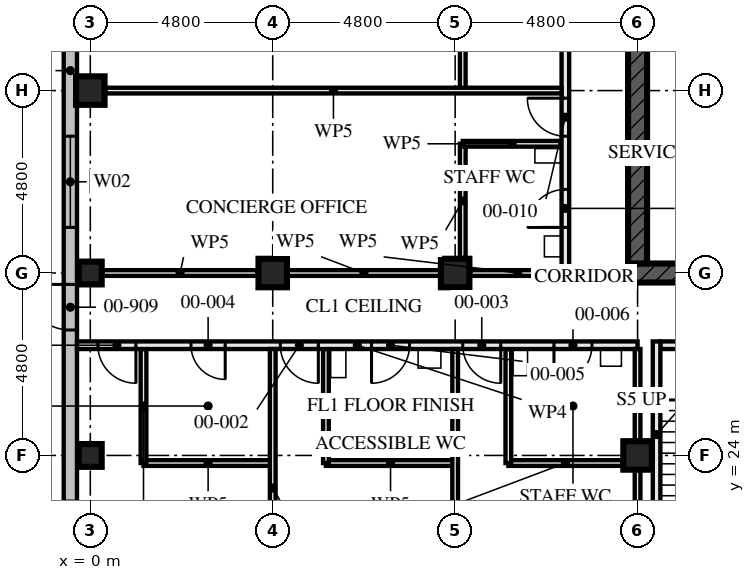
"""IFC4 building model, lengths in metres.
Left out: names, types, materials, properties, quantities, classifications, styles, units other than length and angle.
Written with IfcOpenShell. Run it as: python <this file> out.ifc"""

import sys

from ifc_helpers import new_model, si_unit, direction, frame, frame_2d, origin, origin_2d, place, context, subcontext, project, spatial, rectangle, hollow_rectangle, extrude, element, fill, save


model = new_model("IFC4")
c1 = context("Model", 3, precision=1e-05, world=origin(), true_north=direction((0.0, 1.0)))
c2 = subcontext(c1, "Body", "Model", "MODEL_VIEW")
j1 = project(units=[si_unit("LENGTHUNIT", "METRE"), si_unit("PLANEANGLEUNIT", "RADIAN")], contexts=[c1])
p1 = place(None, origin())
s1 = spatial("IfcSite", under=j1, at=p1, CompositionType="ELEMENT")
p2 = place(p1, origin())
s2 = spatial("IfcBuilding", under=s1, at=p2, CompositionType="ELEMENT")
p3 = place(p2, origin())
s3 = spatial("IfcBuildingStorey", under=s2, at=p3, CompositionType="ELEMENT", Elevation=0.0)
for number, where, z_axis, x_axis in (
    (1, (0.0, 24.0, 0.0), (0.0, 0.0, 1.0), (1.0, 0.0, 0.0)),
    (2, (0.0, 28.8, 0.0), (0.0, 0.0, 1.0), (0.0, 1.0, 0.0)),
):
    element("IfcColumn", number, at=place(p3, frame(where, z_axis=z_axis, x_axis=x_axis)), inside=s3, PredefinedType="COLUMN", context=c2, shape_type="SweptSolid", body=[
        extrude(hollow_rectangle(XDim=0.6, YDim=0.6, WallThickness=0.08, at=origin_2d()), origin(), (0.0, 0.0, 1.0), 4.5),
    ])
for number, where, z_axis, x_axis in (
    (3, (0.0, 33.6, 0.0), (0.0, 0.0, 1.0), (1.0, 0.0, 0.0)),
    (4, (4.8, 28.8, 0.0), (0.0, 0.0, 1.0), (0.0, 1.0, 0.0)),
    (5, (9.6, 28.8, 0.0), (0.0, 0.0, 1.0), (0.0, 1.0, 0.0)),
    (6, (14.4, 24.0, 0.0), (0.0, 0.0, 1.0), (1.0, 0.0, 0.0)),
):
    element("IfcColumn", number, at=place(p3, frame(where, z_axis=z_axis, x_axis=x_axis)), inside=s3, PredefinedType="COLUMN", context=c2, shape_type="SweptSolid", body=[
        extrude(hollow_rectangle(XDim=0.75, YDim=0.75, WallThickness=0.08, at=origin_2d()), origin(), (0.0, 0.0, 1.0), 4.5),
    ])
p4 = place(p3, frame((14.15, 28.8, -1.8), z_axis=(0.0, 0.0, 1.0), x_axis=(1.0, 0.0, 0.0)))
e7 = element("IfcWall", 7, at=p4, inside=s3, PredefinedType="SHEAR", context=c2, shape_type="SweptSolid", body=[
    extrude(rectangle(XDim=14.9, YDim=0.5, at=frame_2d((7.45, 0.0))), origin(), (0.0, 0.0, 1.0), 6.13),
])
p5 = place(p4, frame((6.85, 0.0, 1.8)))
e8 = element("IfcOpeningElement", 8, at=p5, cuts=e7, PredefinedType="OPENING", context=c2, shape_type="SweptSolid", body=[
    extrude(rectangle(XDim=1.2, YDim=2.1, at=frame_2d((0.6, 1.05))), frame((0.0, 0.26, 0.0), z_axis=(0.0, -1.0, 0.0), x_axis=(1.0, 0.0, 0.0)), (0.0, 0.0, 1.0), 0.521),
])
p6 = place(p3, frame((14.4, 42.95, -1.8), z_axis=(0.0, 0.0, 1.0), x_axis=(0.0, -1.0, 0.0)))
e9 = element("IfcWall", 9, at=p6, inside=s3, PredefinedType="SHEAR", context=c2, shape_type="SweptSolid", body=[
    extrude(rectangle(XDim=13.9, YDim=0.5, at=frame_2d((6.95, 0.0))), origin(), (0.0, 0.0, 1.0), 6.13),
])
p7 = place(p6, frame((6.35, 0.0, 1.8)))
e10 = element("IfcOpeningElement", 10, at=p7, cuts=e9, PredefinedType="OPENING", context=c2, shape_type="SweptSolid", body=[
    extrude(rectangle(XDim=1.2, YDim=2.1, at=frame_2d((0.6, 1.05))), frame((0.0, 0.26, 0.0), z_axis=(0.0, -1.0, 0.0), x_axis=(1.0, 0.0, 0.0)), (0.0, 0.0, 1.0), 0.521),
])
p8 = place(p3, frame((-0.525, 53.325, 0.0), z_axis=(0.0, 0.0, 1.0), x_axis=(0.0, -1.0, 0.0)))
e11 = element("IfcWall", 11, at=p8, inside=s3, PredefinedType="SOLIDWALL", context=c2, shape_type="SweptSolid", body=[
    extrude(rectangle(XDim=38.4, YDim=0.35, at=frame_2d((19.2, 0.0))), origin(), (0.0, 0.0, 1.0), 4.5),
])
p9 = place(p8, frame((11.925, 0.0, 0.0)))
e12 = element("IfcOpeningElement", 12, at=p9, cuts=e11, PredefinedType="OPENING", context=c2, shape_type="SweptSolid", body=[
    extrude(rectangle(XDim=1.2, YDim=2.4, at=frame_2d((0.6, 1.2))), frame((0.0, 0.186, 0.0), z_axis=(0.0, -1.0, 0.0), x_axis=(1.0, 0.0, 0.0)), (0.0, 0.0, 1.0), 0.371),
])
p10 = place(p8, frame((24.825, 0.0, 0.0)))
e13 = element("IfcOpeningElement", 13, at=p10, cuts=e11, PredefinedType="OPENING", context=c2, shape_type="SweptSolid", body=[
    extrude(rectangle(XDim=1.2, YDim=2.4, at=frame_2d((0.6, 1.2))), frame((0.0, 0.186, 0.0), z_axis=(0.0, -1.0, 0.0), x_axis=(1.0, 0.0, 0.0)), (0.0, 0.0, 1.0), 0.371),
])
p11 = place(p8, frame((35.325, 0.0, 0.9)))
e14 = element("IfcOpeningElement", 14, at=p11, cuts=e11, PredefinedType="OPENING", context=c2, shape_type="SweptSolid", body=[
    extrude(rectangle(XDim=2.4, YDim=2.4, at=frame_2d((1.2, 1.2))), frame((0.0, 0.186, 0.0), z_axis=(0.0, -1.0, 0.0), x_axis=(1.0, 0.0, 0.0)), (0.0, 0.0, 1.0), 0.371),
])
p12 = place(p8, frame((30.525, 0.0, 0.9)))
e15 = element("IfcOpeningElement", 15, at=p12, cuts=e11, PredefinedType="OPENING", context=c2, shape_type="SweptSolid", body=[
    extrude(rectangle(XDim=2.4, YDim=2.4, at=frame_2d((1.2, 1.2))), frame((0.0, 0.186, 0.0), z_axis=(0.0, -1.0, 0.0), x_axis=(1.0, 0.0, 0.0)), (0.0, 0.0, 1.0), 0.371),
])
p13 = place(p8, frame((20.925, 0.0, 0.9)))
e16 = element("IfcOpeningElement", 16, at=p13, cuts=e11, PredefinedType="OPENING", context=c2, shape_type="SweptSolid", body=[
    extrude(rectangle(XDim=2.4, YDim=2.4, at=frame_2d((1.2, 1.2))), frame((0.0, 0.186, 0.0), z_axis=(0.0, -1.0, 0.0), x_axis=(1.0, 0.0, 0.0)), (0.0, 0.0, 1.0), 0.371),
])
p14 = place(p8, frame((16.125, 0.0, 0.9)))
e17 = element("IfcOpeningElement", 17, at=p14, cuts=e11, PredefinedType="OPENING", context=c2, shape_type="SweptSolid", body=[
    extrude(rectangle(XDim=2.4, YDim=2.4, at=frame_2d((1.2, 1.2))), frame((0.0, 0.186, 0.0), z_axis=(0.0, -1.0, 0.0), x_axis=(1.0, 0.0, 0.0)), (0.0, 0.0, 1.0), 0.371),
])
p15 = place(p8, frame((6.525, 0.0, 0.9)))
e18 = element("IfcOpeningElement", 18, at=p15, cuts=e11, PredefinedType="OPENING", context=c2, shape_type="SweptSolid", body=[
    extrude(rectangle(XDim=2.4, YDim=2.4, at=frame_2d((1.2, 1.2))), frame((0.0, 0.186, 0.0), z_axis=(0.0, -1.0, 0.0), x_axis=(1.0, 0.0, 0.0)), (0.0, 0.0, 1.0), 0.371),
])
p16 = place(p8, frame((1.725, 0.0, 0.9)))
e19 = element("IfcOpeningElement", 19, at=p16, cuts=e11, PredefinedType="OPENING", context=c2, shape_type="SweptSolid", body=[
    extrude(rectangle(XDim=2.4, YDim=2.4, at=frame_2d((1.2, 1.2))), frame((0.0, 0.186, 0.0), z_axis=(0.0, -1.0, 0.0), x_axis=(1.0, 0.0, 0.0)), (0.0, 0.0, 1.0), 0.371),
])
p17 = place(p3, frame((1.4, 23.8, 0.0), z_axis=(0.0, 0.0, 1.0), x_axis=(0.0, 1.0, 0.0)))
e20 = element("IfcWall", 20, at=p17, inside=s3, PredefinedType="PARTITIONING", context=c2, shape_type="SweptSolid", body=[
    extrude(rectangle(XDim=3.0, YDim=0.15, at=frame_2d((1.5, 0.0))), origin(), (0.0, 0.0, 1.0), 3.55),
])
p18 = place(p3, frame((1.4, 23.8, 0.0), z_axis=(0.0, 0.0, 1.0), x_axis=(1.0, 0.0, 0.0)))
e21 = element("IfcWall", 21, at=p18, inside=s3, PredefinedType="PARTITIONING", context=c2, shape_type="SweptSolid", body=[
    extrude(rectangle(XDim=3.4, YDim=0.15, at=frame_2d((1.7, 0.0))), origin(), (0.0, 0.0, 1.0), 4.33),
])
p19 = place(p3, frame((6.2, 23.8, 0.0), z_axis=(0.0, 0.0, 1.0), x_axis=(0.0, 1.0, 0.0)))
e22 = element("IfcWall", 22, at=p19, inside=s3, PredefinedType="PARTITIONING", context=c2, shape_type="SweptSolid", body=[
    extrude(rectangle(XDim=3.0, YDim=0.15, at=frame_2d((1.5, 0.0))), origin(), (0.0, 0.0, 1.0), 3.55),
])
p20 = place(p3, frame((6.2, 23.8, 0.0), z_axis=(0.0, 0.0, 1.0), x_axis=(1.0, 0.0, 0.0)))
e23 = element("IfcWall", 23, at=p20, inside=s3, PredefinedType="PARTITIONING", context=c2, shape_type="SweptSolid", body=[
    extrude(rectangle(XDim=3.4, YDim=0.15, at=frame_2d((1.7, 0.0))), origin(), (0.0, 0.0, 1.0), 4.33),
])
p21 = place(p3, frame((11.0, 23.8, 0.0), z_axis=(0.0, 0.0, 1.0), x_axis=(0.0, 1.0, 0.0)))
e24 = element("IfcWall", 24, at=p21, inside=s3, PredefinedType="PARTITIONING", context=c2, shape_type="SweptSolid", body=[
    extrude(rectangle(XDim=3.0, YDim=0.15, at=frame_2d((1.5, 0.0))), origin(), (0.0, 0.0, 1.0), 3.55),
])
p22 = place(p3, frame((11.0, 23.8, 0.0), z_axis=(0.0, 0.0, 1.0), x_axis=(1.0, 0.0, 0.0)))
e25 = element("IfcWall", 25, at=p22, inside=s3, PredefinedType="PARTITIONING", context=c2, shape_type="SweptSolid", body=[
    extrude(rectangle(XDim=3.005, YDim=0.15, at=frame_2d((1.502, 0.0))), origin(), (0.0, 0.0, 1.0), 4.33),
])
p23 = place(p3, frame((4.8, 19.486, 0.0), z_axis=(0.0, 0.0, 1.0), x_axis=(0.0, 1.0, 0.0)))
e26 = element("IfcWall", 26, at=p23, inside=s3, PredefinedType="PARTITIONING", context=c2, shape_type="SweptSolid", body=[
    extrude(rectangle(XDim=7.314, YDim=0.15, at=frame_2d((3.657, 0.0))), origin(), (0.0, 0.0, 1.0), 3.55),
])
p24 = place(p3, frame((9.6, 14.686, 0.0), z_axis=(0.0, 0.0, 1.0), x_axis=(0.0, 1.0, 0.0)))
e27 = element("IfcWall", 27, at=p24, inside=s3, PredefinedType="PARTITIONING", context=c2, shape_type="SweptSolid", body=[
    extrude(rectangle(XDim=12.115, YDim=0.15, at=frame_2d((6.057, 0.0))), origin(), (0.0, 0.0, 1.0), 3.55),
])
p25 = place(p3, frame((-0.35, 26.9, 0.0), z_axis=(0.0, 0.0, 1.0), x_axis=(1.0, 0.0, 0.0)))
e28 = element("IfcWall", 28, at=p25, inside=s3, PredefinedType="PARTITIONING", context=c2, shape_type="SweptSolid", body=[
    extrude(rectangle(XDim=14.75, YDim=0.2, at=frame_2d((7.375, 0.0))), origin(), (0.0, 0.0, 1.0), 3.32),
])
p26 = place(p25, frame((0.55, 0.0, 0.0)))
e29 = element("IfcOpeningElement", 29, at=p26, cuts=e28, PredefinedType="OPENING", context=c2, shape_type="SweptSolid", body=[
    extrude(rectangle(XDim=1.0, YDim=2.4, at=frame_2d((0.5, 1.2))), frame((0.0, 0.111, 0.0), z_axis=(0.0, -1.0, 0.0), x_axis=(1.0, 0.0, 0.0)), (0.0, 0.0, 1.0), 0.221),
])
p27 = place(p25, frame((5.35, 0.0, 0.0)))
e30 = element("IfcOpeningElement", 30, at=p27, cuts=e28, PredefinedType="OPENING", context=c2, shape_type="SweptSolid", body=[
    extrude(rectangle(XDim=1.0, YDim=2.4, at=frame_2d((0.5, 1.2))), frame((0.0, 0.111, 0.0), z_axis=(0.0, -1.0, 0.0), x_axis=(1.0, 0.0, 0.0)), (0.0, 0.0, 1.0), 0.221),
])
p28 = place(p25, frame((10.15, 0.0, 0.0)))
e31 = element("IfcOpeningElement", 31, at=p28, cuts=e28, PredefinedType="OPENING", context=c2, shape_type="SweptSolid", body=[
    extrude(rectangle(XDim=1.0, YDim=2.4, at=frame_2d((0.5, 1.2))), frame((0.0, 0.111, 0.0), z_axis=(0.0, -1.0, 0.0), x_axis=(1.0, 0.0, 0.0)), (0.0, 0.0, 1.0), 0.221),
])
p29 = place(p25, frame((3.0, 0.0, 0.0)))
e32 = element("IfcOpeningElement", 32, at=p29, cuts=e28, PredefinedType="OPENING", context=c2, shape_type="SweptSolid", body=[
    extrude(rectangle(XDim=0.9, YDim=2.1, at=frame_2d((0.45, 1.05))), frame((0.0, 0.111, 0.0), z_axis=(0.0, -1.0, 0.0), x_axis=(1.0, 0.0, 0.0)), (0.0, 0.0, 1.0), 0.221),
])
p30 = place(p25, frame((7.75, 0.0, 0.0)))
e33 = element("IfcOpeningElement", 33, at=p30, cuts=e28, PredefinedType="OPENING", context=c2, shape_type="SweptSolid", body=[
    extrude(rectangle(XDim=1.0, YDim=2.1, at=frame_2d((0.5, 1.05))), frame((0.0, 0.111, 0.0), z_axis=(0.0, -1.0, 0.0), x_axis=(1.0, 0.0, 0.0)), (0.0, 0.0, 1.0), 0.221),
])
p31 = place(p25, frame((12.55, 0.0, 0.0)))
e34 = element("IfcOpeningElement", 34, at=p31, cuts=e28, PredefinedType="OPENING", context=c2, shape_type="SweptSolid", body=[
    extrude(rectangle(XDim=1.0, YDim=2.1, at=frame_2d((0.5, 1.05))), frame((0.0, 0.111, 0.0), z_axis=(0.0, -1.0, 0.0), x_axis=(1.0, 0.0, 0.0)), (0.0, 0.0, 1.0), 0.221),
])
p32 = place(p3, frame((9.8, 37.0, 0.0), z_axis=(0.0, 0.0, 1.0), x_axis=(0.0, -1.0, 0.0)))
e35 = element("IfcWall", 35, at=p32, inside=s3, PredefinedType="PARTITIONING", context=c2, shape_type="SweptSolid", body=[
    extrude(rectangle(XDim=3.4, YDim=0.15, at=frame_2d((1.7, 0.0))), origin(), (0.0, 0.0, 1.0), 4.33),
])
p33 = place(p3, frame((9.8, 32.2, 0.0), z_axis=(0.0, 0.0, 1.0), x_axis=(1.0, 0.0, 0.0)))
e36 = element("IfcWall", 36, at=p33, inside=s3, PredefinedType="PARTITIONING", context=c2, shape_type="SweptSolid", body=[
    extrude(rectangle(XDim=2.6, YDim=0.15, at=frame_2d((1.3, 0.0))), origin(), (0.0, 0.0, 1.0), 4.33),
])
p34 = place(p3, frame((9.8, 32.2, 0.0), z_axis=(0.0, 0.0, 1.0), x_axis=(0.0, -1.0, 0.0)))
e37 = element("IfcWall", 37, at=p34, inside=s3, PredefinedType="PARTITIONING", context=c2, shape_type="SweptSolid", body=[
    extrude(rectangle(XDim=3.005, YDim=0.15, at=frame_2d((1.502, 0.0))), origin(), (0.0, 0.0, 1.0), 4.33),
])
p35 = place(p3, frame((0.395, 33.6, 0.0), z_axis=(0.0, 0.0, 1.0), x_axis=(1.0, 0.0, 0.0)))
e38 = element("IfcWall", 38, at=p35, inside=s3, PredefinedType="PARTITIONING", context=c2, shape_type="SweptSolid", body=[
    extrude(rectangle(XDim=12.005, YDim=0.15, at=frame_2d((6.002, 0.0))), origin(), (0.0, 0.0, 1.0), 3.55),
])
p36 = place(p3, frame((12.5, 43.2, 0.0), z_axis=(0.0, 0.0, 1.0), x_axis=(0.0, -1.0, 0.0)))
e39 = element("IfcWall", 39, at=p36, inside=s3, PredefinedType="PARTITIONING", context=c2, shape_type="SweptSolid", body=[
    extrude(rectangle(XDim=14.4, YDim=0.2, at=frame_2d((7.2, 0.0))), origin(), (0.0, 0.0, 1.0), 3.55),
])
p37 = place(p36, frame((3.462, 0.0, 0.0)))
e40 = element("IfcOpeningElement", 40, at=p37, cuts=e39, PredefinedType="OPENING", context=c2, shape_type="SweptSolid", body=[
    extrude(rectangle(XDim=1.2, YDim=2.4, at=frame_2d((0.6, 1.2))), frame((0.0, 0.111, 0.0), z_axis=(0.0, -1.0, 0.0), x_axis=(1.0, 0.0, 0.0)), (0.0, 0.0, 1.0), 0.221),
])
p38 = place(p36, frame((5.0, 0.0, 0.0)))
e41 = element("IfcOpeningElement", 41, at=p38, cuts=e39, PredefinedType="OPENING", context=c2, shape_type="SweptSolid", body=[
    extrude(rectangle(XDim=1.0, YDim=2.4, at=frame_2d((0.5, 1.2))), frame((0.0, 0.111, 0.0), z_axis=(0.0, -1.0, 0.0), x_axis=(1.0, 0.0, 0.0)), (0.0, 0.0, 1.0), 0.221),
])
p39 = place(p36, frame((9.8, 0.0, 0.0)))
e42 = element("IfcOpeningElement", 42, at=p39, cuts=e39, PredefinedType="OPENING", context=c2, shape_type="SweptSolid", body=[
    extrude(rectangle(XDim=1.0, YDim=2.4, at=frame_2d((0.5, 1.2))), frame((0.0, 0.111, 0.0), z_axis=(0.0, -1.0, 0.0), x_axis=(1.0, 0.0, 0.0)), (0.0, 0.0, 1.0), 0.221),
])
p40 = place(p36, frame((7.45, 0.0, 0.0)))
e43 = element("IfcOpeningElement", 43, at=p40, cuts=e39, PredefinedType="OPENING", context=c2, shape_type="SweptSolid", body=[
    extrude(rectangle(XDim=0.9, YDim=2.1, at=frame_2d((0.45, 1.05))), frame((0.0, 0.111, 0.0), z_axis=(0.0, -1.0, 0.0), x_axis=(1.0, 0.0, 0.0)), (0.0, 0.0, 1.0), 0.221),
])
p41 = place(p36, frame((12.2, 0.0, 0.0)))
e44 = element("IfcOpeningElement", 44, at=p41, cuts=e39, PredefinedType="OPENING", context=c2, shape_type="SweptSolid", body=[
    extrude(rectangle(XDim=1.0, YDim=2.1, at=frame_2d((0.5, 1.05))), frame((0.0, 0.111, 0.0), z_axis=(0.0, -1.0, 0.0), x_axis=(1.0, 0.0, 0.0)), (0.0, 0.0, 1.0), 0.221),
])
p42 = place(p3, frame((14.9, 22.1, 0.0), z_axis=(0.0, 0.0, 1.0), x_axis=(0.0, 1.0, 0.0)))
e45 = element("IfcWall", 45, at=p42, inside=s3, PredefinedType="SOLIDWALL", context=c2, shape_type="SweptSolid", body=[
    extrude(rectangle(XDim=4.9, YDim=0.2, at=frame_2d((2.45, 0.0))), origin(), (0.0, 0.0, 1.0), 3.99),
])
p43 = place(p3, frame((15.0, 26.9, 0.0), z_axis=(0.0, 0.0, 1.0), x_axis=(1.0, 0.0, 0.0)))
e46 = element("IfcWall", 46, at=p43, inside=s3, PredefinedType="SOLIDWALL", context=c2, shape_type="SweptSolid", body=[
    extrude(rectangle(XDim=2.6, YDim=0.2, at=frame_2d((1.3, 0.0))), origin(), (0.0, 0.0, 1.0), 4.33),
])
p44 = place(p43, frame((0.8, 0.0, 0.0)))
e47 = element("IfcOpeningElement", 47, at=p44, cuts=e46, PredefinedType="OPENING", context=c2, shape_type="SweptSolid", body=[
    extrude(rectangle(XDim=1.0, YDim=2.1, at=frame_2d((0.5, 1.05))), frame((0.0, 0.111, 0.0), z_axis=(0.0, -1.0, 0.0), x_axis=(1.0, 0.0, 0.0)), (0.0, 0.0, 1.0), 0.221),
])
p45 = place(p3, frame((12.5, 28.8, 0.0), z_axis=(0.0, 0.0, 1.0), x_axis=(-1.0, 0.0, 0.0)))
e48 = element("IfcWall", 48, at=p45, inside=s3, PredefinedType="PARTITIONING", context=c2, shape_type="SweptSolid", body=[
    extrude(rectangle(XDim=2.505, YDim=0.15, at=frame_2d((1.252, 0.0))), origin(), (0.0, 0.0, 1.0), 3.32),
])
p46 = place(p3, frame((9.205, 28.8, 0.0), z_axis=(0.0, 0.0, 1.0), x_axis=(-1.0, 0.0, 0.0)))
e49 = element("IfcWall", 49, at=p46, inside=s3, PredefinedType="PARTITIONING", context=c2, shape_type="SweptSolid", body=[
    extrude(rectangle(XDim=4.01, YDim=0.15, at=frame_2d((2.005, 0.0))), origin(), (0.0, 0.0, 1.0), 3.32),
])
p47 = place(p3, frame((4.405, 28.8, 0.0), z_axis=(0.0, 0.0, 1.0), x_axis=(-1.0, 0.0, 0.0)))
e50 = element("IfcWall", 50, at=p47, inside=s3, PredefinedType="PARTITIONING", context=c2, shape_type="SweptSolid", body=[
    extrude(rectangle(XDim=4.085, YDim=0.15, at=frame_2d((2.042, 0.0))), origin(), (0.0, 0.0, 1.0), 3.32),
])
p48 = place(p3, frame((14.4, 19.595, 0.0), z_axis=(0.0, 0.0, 1.0), x_axis=(0.0, 1.0, 0.0)))
e51 = element("IfcWall", 51, at=p48, inside=s3, PredefinedType="PARTITIONING", context=c2, shape_type="SweptSolid", body=[
    extrude(rectangle(XDim=4.01, YDim=0.15, at=frame_2d((2.005, 0.0))), origin(), (0.0, 0.0, 1.0), 3.32),
])
p49 = place(p3, frame((14.4, 24.395, 0.0), z_axis=(0.0, 0.0, 1.0), x_axis=(0.0, 1.0, 0.0)))
e52 = element("IfcWall", 52, at=p49, inside=s3, PredefinedType="PARTITIONING", context=c2, shape_type="SweptSolid", body=[
    extrude(rectangle(XDim=2.405, YDim=0.15, at=frame_2d((1.203, 0.0))), origin(), (0.0, 0.0, 1.0), 3.32),
])
p50 = place(p10, frame((1.2, 0.0, 0.0), z_axis=(0.0, 0.0, 1.0), x_axis=(-1.0, 0.0, 0.0)))
e53 = element("IfcDoor", 53, at=p50, inside=s3, OperationType="SINGLE_SWING_LEFT", PredefinedType="DOOR", context=c2, shape_type="SweptSolid", body=[
    extrude(rectangle(XDim=1.2, YDim=2.4, at=frame_2d((0.6, 1.2))), frame((0.0, 0.027, 0.0), z_axis=(0.0, -1.0, 0.0), x_axis=(1.0, 0.0, 0.0)), (0.0, 0.0, 1.0), 0.054),
])
fill(e13, e53)
p51 = place(p13, origin())
e54 = element("IfcWindow", 54, at=p51, inside=s3, PartitioningType="SINGLE_PANEL", PredefinedType="WINDOW", context=c2, shape_type="SweptSolid", body=[
    extrude(rectangle(XDim=2.4, YDim=2.4, at=frame_2d((1.2, 1.2))), frame((0.0, 0.03, 0.0), z_axis=(0.0, -1.0, 0.0), x_axis=(1.0, 0.0, 0.0)), (0.0, 0.0, 1.0), 0.06),
])
fill(e16, e54)
p52 = place(p26, frame((1.0, 0.0, 0.0), z_axis=(0.0, 0.0, 1.0), x_axis=(-1.0, 0.0, 0.0)))
e55 = element("IfcDoor", 55, at=p52, inside=s3, OperationType="SINGLE_SWING_RIGHT", PredefinedType="DOOR", context=c2, shape_type="SweptSolid", body=[
    extrude(rectangle(XDim=1.0, YDim=2.4, at=frame_2d((0.5, 1.2))), frame((0.0, 0.027, 0.0), z_axis=(0.0, -1.0, 0.0), x_axis=(1.0, 0.0, 0.0)), (0.0, 0.0, 1.0), 0.054),
])
fill(e29, e55)
p53 = place(p27, frame((1.0, 0.0, 0.0), z_axis=(0.0, 0.0, 1.0), x_axis=(-1.0, 0.0, 0.0)))
e56 = element("IfcDoor", 56, at=p53, inside=s3, OperationType="SINGLE_SWING_RIGHT", PredefinedType="DOOR", context=c2, shape_type="SweptSolid", body=[
    extrude(rectangle(XDim=1.0, YDim=2.4, at=frame_2d((0.5, 1.2))), frame((0.0, 0.027, 0.0), z_axis=(0.0, -1.0, 0.0), x_axis=(1.0, 0.0, 0.0)), (0.0, 0.0, 1.0), 0.054),
])
fill(e30, e56)
p54 = place(p28, frame((1.0, 0.0, 0.0), z_axis=(0.0, 0.0, 1.0), x_axis=(-1.0, 0.0, 0.0)))
e57 = element("IfcDoor", 57, at=p54, inside=s3, OperationType="SINGLE_SWING_RIGHT", PredefinedType="DOOR", context=c2, shape_type="SweptSolid", body=[
    extrude(rectangle(XDim=1.0, YDim=2.4, at=frame_2d((0.5, 1.2))), frame((0.0, 0.027, 0.0), z_axis=(0.0, -1.0, 0.0), x_axis=(1.0, 0.0, 0.0)), (0.0, 0.0, 1.0), 0.054),
])
fill(e31, e57)
p55 = place(p29, frame((0.9, 0.0, 0.0), z_axis=(0.0, 0.0, 1.0), x_axis=(-1.0, 0.0, 0.0)))
e58 = element("IfcDoor", 58, at=p55, inside=s3, OperationType="SINGLE_SWING_RIGHT", PredefinedType="DOOR", context=c2, shape_type="SweptSolid", body=[
    extrude(rectangle(XDim=0.9, YDim=2.1, at=frame_2d((0.45, 1.05))), frame((0.0, 0.027, 0.0), z_axis=(0.0, -1.0, 0.0), x_axis=(1.0, 0.0, 0.0)), (0.0, 0.0, 1.0), 0.054),
])
fill(e32, e58)
p56 = place(p30, frame((1.0, 0.0, 0.0), z_axis=(0.0, 0.0, 1.0), x_axis=(-1.0, 0.0, 0.0)))
e59 = element("IfcDoor", 59, at=p56, inside=s3, OperationType="SINGLE_SWING_LEFT", PredefinedType="DOOR", context=c2, shape_type="SweptSolid", body=[
    extrude(rectangle(XDim=1.0, YDim=2.1, at=frame_2d((0.5, 1.05))), frame((0.0, 0.027, 0.0), z_axis=(0.0, -1.0, 0.0), x_axis=(1.0, 0.0, 0.0)), (0.0, 0.0, 1.0), 0.054),
])
fill(e33, e59)
p57 = place(p31, frame((1.0, 0.0, 0.0), z_axis=(0.0, 0.0, 1.0), x_axis=(-1.0, 0.0, 0.0)))
e60 = element("IfcDoor", 60, at=p57, inside=s3, OperationType="SINGLE_SWING_LEFT", PredefinedType="DOOR", context=c2, shape_type="SweptSolid", body=[
    extrude(rectangle(XDim=1.0, YDim=2.1, at=frame_2d((0.5, 1.05))), frame((0.0, 0.027, 0.0), z_axis=(0.0, -1.0, 0.0), x_axis=(1.0, 0.0, 0.0)), (0.0, 0.0, 1.0), 0.054),
])
fill(e34, e60)
p58 = place(p39, frame((1.0, 0.0, 0.0), z_axis=(0.0, 0.0, 1.0), x_axis=(-1.0, 0.0, 0.0)))
e61 = element("IfcDoor", 61, at=p58, inside=s3, OperationType="SINGLE_SWING_LEFT", PredefinedType="DOOR", context=c2, shape_type="SweptSolid", body=[
    extrude(rectangle(XDim=1.0, YDim=2.4, at=frame_2d((0.5, 1.2))), frame((0.0, 0.027, 0.0), z_axis=(0.0, -1.0, 0.0), x_axis=(1.0, 0.0, 0.0)), (0.0, 0.0, 1.0), 0.054),
])
fill(e42, e61)
p59 = place(p41, frame((1.0, 0.0, 0.0), z_axis=(0.0, 0.0, 1.0), x_axis=(-1.0, 0.0, 0.0)))
e62 = element("IfcDoor", 62, at=p59, inside=s3, OperationType="SINGLE_SWING_RIGHT", PredefinedType="DOOR", context=c2, shape_type="SweptSolid", body=[
    extrude(rectangle(XDim=1.0, YDim=2.1, at=frame_2d((0.5, 1.05))), frame((0.0, 0.027, 0.0), z_axis=(0.0, -1.0, 0.0), x_axis=(1.0, 0.0, 0.0)), (0.0, 0.0, 1.0), 0.054),
])
fill(e44, e62)
save(model, sys.argv[1])
